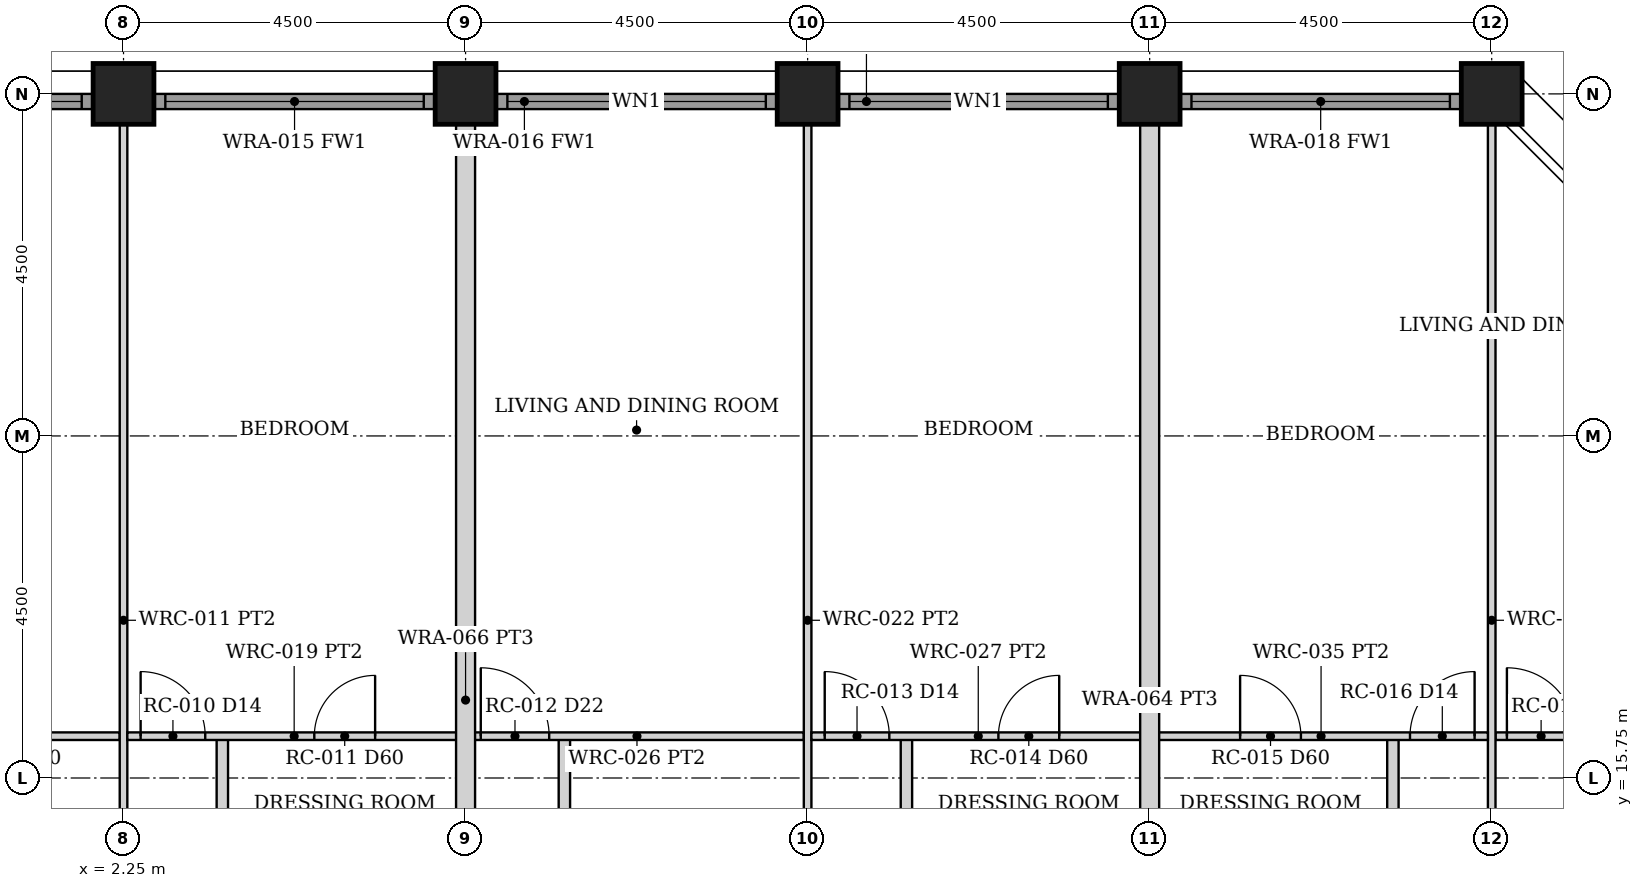
"""IFC4 building model, lengths in metres.
Left out: names, types, materials, properties, quantities, classifications, styles, units other than length and angle.
Written with IfcOpenShell. Run it as: python <this file> out.ifc"""

import sys

from ifc_helpers import new_model, si_unit, direction, frame, frame_2d, origin, origin_2d, place, context, subcontext, project, spatial, rectangle, hollow_rectangle, extrude, element, fill, save


model = new_model("IFC4")
c1 = context("Model", 3, precision=1e-05, world=origin(), true_north=direction((0.0, 1.0)))
c2 = subcontext(c1, "Body", "Model", "MODEL_VIEW")
j1 = project(units=[si_unit("LENGTHUNIT", "METRE"), si_unit("PLANEANGLEUNIT", "RADIAN")], contexts=[c1])
p1 = place(None, origin())
s1 = spatial("IfcSite", under=j1, at=p1, CompositionType="ELEMENT")
p2 = place(p1, origin())
s2 = spatial("IfcBuilding", under=s1, at=p2, CompositionType="ELEMENT")
p3 = place(p2, frame((0.0, 0.0, 47.5)))
s3 = spatial("IfcBuildingStorey", under=s2, at=p3, CompositionType="ELEMENT", Elevation=47.5)
for number, where, z_axis, x_axis in (
    (1, (2.25, 24.75, 0.0), (0.0, 0.0, 1.0), (0.0, 1.0, 0.0)),
    (2, (6.75, 24.75, 0.0), (0.0, 0.0, 1.0), (0.0, 1.0, 0.0)),
    (3, (11.25, 24.75, 0.0), (0.0, 0.0, 1.0), (0.0, 1.0, 0.0)),
    (4, (15.75, 24.75, 0.0), (0.0, 0.0, 1.0), (0.0, 1.0, 0.0)),
    (5, (20.25, 24.75, 0.0), (0.0, 0.0, 1.0), (0.0, 1.0, 0.0)),
):
    element("IfcColumn", number, at=place(p3, frame(where, z_axis=z_axis, x_axis=x_axis)), inside=s3, PredefinedType="COLUMN", context=c2, shape_type="SweptSolid", body=[
        extrude(hollow_rectangle(XDim=0.8, YDim=0.8, WallThickness=0.07, at=origin_2d()), origin(), (0.0, 0.0, 1.0), 3.5),
    ])
p4 = place(p3, frame((-1.845, 24.65, 0.0), z_axis=(0.0, 0.0, 1.0), x_axis=(1.0, 0.0, 0.0)))
e6 = element("IfcWall", 6, at=p4, inside=s3, PredefinedType="SOLIDWALL", context=c2, shape_type="SweptSolid", body=[
    extrude(rectangle(XDim=3.69, YDim=0.2, at=frame_2d((1.845, 0.0))), origin(), (0.0, 0.0, 1.0), 2.379),
])
p5 = place(p4, frame((0.145, 0.0, 0.3)))
e7 = element("IfcOpeningElement", 7, at=p5, cuts=e6, PredefinedType="OPENING", context=c2, shape_type="SweptSolid", body=[
    extrude(rectangle(XDim=3.4, YDim=1.929, at=frame_2d((1.7, 0.964))), frame((0.0, 0.11, 0.0), z_axis=(0.0, -1.0, 0.0), x_axis=(1.0, 0.0, 0.0)), (0.0, 0.0, 1.0), 0.22),
])
p6 = place(p3, frame((2.655, 24.65, 0.0), z_axis=(0.0, 0.0, 1.0), x_axis=(1.0, 0.0, 0.0)))
e8 = element("IfcWall", 8, at=p6, inside=s3, PredefinedType="SOLIDWALL", context=c2, shape_type="SweptSolid", body=[
    extrude(rectangle(XDim=3.69, YDim=0.2, at=frame_2d((1.845, 0.0))), origin(), (0.0, 0.0, 1.0), 2.379),
])
p7 = place(p6, frame((0.145, 0.0, 0.3)))
e9 = element("IfcOpeningElement", 9, at=p7, cuts=e8, PredefinedType="OPENING", context=c2, shape_type="SweptSolid", body=[
    extrude(rectangle(XDim=3.4, YDim=1.929, at=frame_2d((1.7, 0.964))), frame((0.0, 0.11, 0.0), z_axis=(0.0, -1.0, 0.0), x_axis=(1.0, 0.0, 0.0)), (0.0, 0.0, 1.0), 0.22),
])
p8 = place(p3, frame((7.155, 24.65, 0.0), z_axis=(0.0, 0.0, 1.0), x_axis=(1.0, 0.0, 0.0)))
e10 = element("IfcWall", 10, at=p8, inside=s3, PredefinedType="SOLIDWALL", context=c2, shape_type="SweptSolid", body=[
    extrude(rectangle(XDim=3.69, YDim=0.2, at=frame_2d((1.845, 0.0))), origin(), (0.0, 0.0, 1.0), 2.379),
])
p9 = place(p8, frame((0.145, 0.0, 0.3)))
e11 = element("IfcOpeningElement", 11, at=p9, cuts=e10, PredefinedType="OPENING", context=c2, shape_type="SweptSolid", body=[
    extrude(rectangle(XDim=3.4, YDim=1.929, at=frame_2d((1.7, 0.964))), frame((0.0, 0.11, 0.0), z_axis=(0.0, -1.0, 0.0), x_axis=(1.0, 0.0, 0.0)), (0.0, 0.0, 1.0), 0.22),
])
p10 = place(p3, frame((11.655, 24.65, 0.0), z_axis=(0.0, 0.0, 1.0), x_axis=(1.0, 0.0, 0.0)))
e12 = element("IfcWall", 12, at=p10, inside=s3, PredefinedType="SOLIDWALL", context=c2, shape_type="SweptSolid", body=[
    extrude(rectangle(XDim=3.69, YDim=0.2, at=frame_2d((1.845, 0.0))), origin(), (0.0, 0.0, 1.0), 2.379),
])
p11 = place(p10, frame((0.145, 0.0, 0.3)))
e13 = element("IfcOpeningElement", 13, at=p11, cuts=e12, PredefinedType="OPENING", context=c2, shape_type="SweptSolid", body=[
    extrude(rectangle(XDim=3.4, YDim=1.929, at=frame_2d((1.7, 0.964))), frame((0.0, 0.11, 0.0), z_axis=(0.0, -1.0, 0.0), x_axis=(1.0, 0.0, 0.0)), (0.0, 0.0, 1.0), 0.22),
])
p12 = place(p3, frame((16.155, 24.65, 0.0), z_axis=(0.0, 0.0, 1.0), x_axis=(1.0, 0.0, 0.0)))
e14 = element("IfcWall", 14, at=p12, inside=s3, PredefinedType="SOLIDWALL", context=c2, shape_type="SweptSolid", body=[
    extrude(rectangle(XDim=3.69, YDim=0.2, at=frame_2d((1.845, 0.0))), origin(), (0.0, 0.0, 1.0), 2.379),
])
p13 = place(p12, frame((0.145, 0.0, 0.3)))
e15 = element("IfcOpeningElement", 15, at=p13, cuts=e14, PredefinedType="OPENING", context=c2, shape_type="SweptSolid", body=[
    extrude(rectangle(XDim=3.4, YDim=1.929, at=frame_2d((1.7, 0.964))), frame((0.0, 0.11, 0.0), z_axis=(0.0, -1.0, 0.0), x_axis=(1.0, 0.0, 0.0)), (0.0, 0.0, 1.0), 0.22),
])
p14 = place(p3, frame((-2.2, 16.3, 0.0), z_axis=(0.0, 0.0, 1.0), x_axis=(1.0, 0.0, 0.0)))
e16 = element("IfcWall", 16, at=p14, inside=s3, PredefinedType="PARTITIONING", context=c2, shape_type="SweptSolid", body=[
    extrude(rectangle(XDim=4.4, YDim=0.1, at=frame_2d((2.2, 0.0))), origin(), (0.0, 0.0, 1.0), 2.373),
])
p15 = place(p14, frame((0.175, 0.0, 0.0)))
e17 = element("IfcOpeningElement", 17, at=p15, cuts=e16, PredefinedType="OPENING", context=c2, shape_type="SweptSolid", body=[
    extrude(rectangle(XDim=0.85, YDim=2.1, at=frame_2d((0.425, 1.05))), frame((0.0, 0.06, 0.0), z_axis=(0.0, -1.0, 0.0), x_axis=(1.0, 0.0, 0.0)), (0.0, 0.0, 1.0), 0.12),
])
p16 = place(p14, frame((2.46, 0.0, 0.0)))
e18 = element("IfcOpeningElement", 18, at=p16, cuts=e16, PredefinedType="OPENING", context=c2, shape_type="SweptSolid", body=[
    extrude(rectangle(XDim=0.8, YDim=2.1, at=frame_2d((0.4, 1.05))), frame((0.0, 0.06, 0.0), z_axis=(0.0, -1.0, 0.0), x_axis=(1.0, 0.0, 0.0)), (0.0, 0.0, 1.0), 0.12),
])
p17 = place(p3, frame((2.25, 11.3, 0.0), z_axis=(0.0, 0.0, 1.0), x_axis=(0.0, 1.0, 0.0)))
e19 = element("IfcWall", 19, at=p17, inside=s3, PredefinedType="PARTITIONING", context=c2, shape_type="SweptSolid", body=[
    extrude(rectangle(XDim=13.05, YDim=0.1, at=frame_2d((6.525, 0.0))), origin(), (0.0, 0.0, 1.0), 2.373),
])
p18 = place(p3, frame((3.55, 11.3, 0.0), z_axis=(0.0, 0.0, 1.0), x_axis=(0.0, 1.0, 0.0)))
e20 = element("IfcWall", 20, at=p18, inside=s3, PredefinedType="PARTITIONING", context=c2, shape_type="SweptSolid", body=[
    extrude(rectangle(XDim=5.0, YDim=0.15, at=frame_2d((2.5, 0.0))), origin(), (0.0, 0.0, 1.0), 2.373),
])
p19 = place(p18, frame((0.85, 0.0, 0.0)))
e21 = element("IfcOpeningElement", 21, at=p19, cuts=e20, PredefinedType="OPENING", context=c2, shape_type="SweptSolid", body=[
    extrude(rectangle(XDim=0.9, YDim=2.1, at=frame_2d((0.45, 1.05))), frame((0.0, 0.085, 0.0), z_axis=(0.0, -1.0, 0.0), x_axis=(1.0, 0.0, 0.0)), (0.0, 0.0, 1.0), 0.17),
])
p20 = place(p3, frame((2.3, 16.3, 0.0), z_axis=(0.0, 0.0, 1.0), x_axis=(1.0, 0.0, 0.0)))
e22 = element("IfcWall", 22, at=p20, inside=s3, PredefinedType="PARTITIONING", context=c2, shape_type="SweptSolid", body=[
    extrude(rectangle(XDim=4.39, YDim=0.1, at=frame_2d((2.195, 0.0))), origin(), (0.0, 0.0, 1.0), 2.373),
])
p21 = place(p20, frame((0.175, 0.0, 0.0)))
e23 = element("IfcOpeningElement", 23, at=p21, cuts=e22, PredefinedType="OPENING", context=c2, shape_type="SweptSolid", body=[
    extrude(rectangle(XDim=0.85, YDim=2.1, at=frame_2d((0.425, 1.05))), frame((0.0, 0.06, 0.0), z_axis=(0.0, -1.0, 0.0), x_axis=(1.0, 0.0, 0.0)), (0.0, 0.0, 1.0), 0.12),
])
p22 = place(p20, frame((2.46, 0.0, 0.0)))
e24 = element("IfcOpeningElement", 24, at=p22, cuts=e22, PredefinedType="OPENING", context=c2, shape_type="SweptSolid", body=[
    extrude(rectangle(XDim=0.8, YDim=2.1, at=frame_2d((0.4, 1.05))), frame((0.0, 0.06, 0.0), z_axis=(0.0, -1.0, 0.0), x_axis=(1.0, 0.0, 0.0)), (0.0, 0.0, 1.0), 0.12),
])
p23 = place(p3, frame((8.05, 11.3, 0.0), z_axis=(0.0, 0.0, 1.0), x_axis=(0.0, 1.0, 0.0)))
e25 = element("IfcWall", 25, at=p23, inside=s3, PredefinedType="PARTITIONING", context=c2, shape_type="SweptSolid", body=[
    extrude(rectangle(XDim=5.0, YDim=0.15, at=frame_2d((2.5, 0.0))), origin(), (0.0, 0.0, 1.0), 2.373),
])
p24 = place(p23, frame((2.05, 0.0, 0.0)))
e26 = element("IfcOpeningElement", 26, at=p24, cuts=e25, PredefinedType="OPENING", context=c2, shape_type="SweptSolid", body=[
    extrude(rectangle(XDim=0.9, YDim=2.1, at=frame_2d((0.45, 1.05))), frame((0.0, 0.085, 0.0), z_axis=(0.0, -1.0, 0.0), x_axis=(1.0, 0.0, 0.0)), (0.0, 0.0, 1.0), 0.17),
])
p25 = place(p3, frame((6.81, 16.3, 0.0), z_axis=(0.0, 0.0, 1.0), x_axis=(1.0, 0.0, 0.0)))
e27 = element("IfcWall", 27, at=p25, inside=s3, PredefinedType="PARTITIONING", context=c2, shape_type="SweptSolid", body=[
    extrude(rectangle(XDim=4.39, YDim=0.1, at=frame_2d((2.195, 0.0))), origin(), (0.0, 0.0, 1.0), 2.373),
])
p26 = place(p25, frame((0.14, 0.0, 0.0)))
e28 = element("IfcOpeningElement", 28, at=p26, cuts=e27, PredefinedType="OPENING", context=c2, shape_type="SweptSolid", body=[
    extrude(rectangle(XDim=0.9, YDim=2.1, at=frame_2d((0.45, 1.05))), frame((0.0, 0.06, 0.0), z_axis=(0.0, -1.0, 0.0), x_axis=(1.0, 0.0, 0.0)), (0.0, 0.0, 1.0), 0.12),
])
p27 = place(p3, frame((11.25, 11.3, 0.0), z_axis=(0.0, 0.0, 1.0), x_axis=(0.0, 1.0, 0.0)))
e29 = element("IfcWall", 29, at=p27, inside=s3, PredefinedType="PARTITIONING", context=c2, shape_type="SweptSolid", body=[
    extrude(rectangle(XDim=13.05, YDim=0.1, at=frame_2d((6.525, 0.0))), origin(), (0.0, 0.0, 1.0), 2.373),
])
p28 = place(p3, frame((12.55, 11.3, 0.0), z_axis=(0.0, 0.0, 1.0), x_axis=(0.0, 1.0, 0.0)))
e30 = element("IfcWall", 30, at=p28, inside=s3, PredefinedType="PARTITIONING", context=c2, shape_type="SweptSolid", body=[
    extrude(rectangle(XDim=5.0, YDim=0.15, at=frame_2d((2.5, 0.0))), origin(), (0.0, 0.0, 1.0), 2.373),
])
p29 = place(p28, frame((0.85, 0.0, 0.0)))
e31 = element("IfcOpeningElement", 31, at=p29, cuts=e30, PredefinedType="OPENING", context=c2, shape_type="SweptSolid", body=[
    extrude(rectangle(XDim=0.9, YDim=2.1, at=frame_2d((0.45, 1.05))), frame((0.0, 0.085, 0.0), z_axis=(0.0, -1.0, 0.0), x_axis=(1.0, 0.0, 0.0)), (0.0, 0.0, 1.0), 0.17),
])
p30 = place(p3, frame((11.3, 16.3, 0.0), z_axis=(0.0, 0.0, 1.0), x_axis=(1.0, 0.0, 0.0)))
e32 = element("IfcWall", 32, at=p30, inside=s3, PredefinedType="PARTITIONING", context=c2, shape_type="SweptSolid", body=[
    extrude(rectangle(XDim=4.39, YDim=0.1, at=frame_2d((2.195, 0.0))), origin(), (0.0, 0.0, 1.0), 2.373),
])
p31 = place(p30, frame((0.175, 0.0, 0.0)))
e33 = element("IfcOpeningElement", 33, at=p31, cuts=e32, PredefinedType="OPENING", context=c2, shape_type="SweptSolid", body=[
    extrude(rectangle(XDim=0.85, YDim=2.1, at=frame_2d((0.425, 1.05))), frame((0.0, 0.06, 0.0), z_axis=(0.0, -1.0, 0.0), x_axis=(1.0, 0.0, 0.0)), (0.0, 0.0, 1.0), 0.12),
])
p32 = place(p30, frame((2.46, 0.0, 0.0)))
e34 = element("IfcOpeningElement", 34, at=p32, cuts=e32, PredefinedType="OPENING", context=c2, shape_type="SweptSolid", body=[
    extrude(rectangle(XDim=0.8, YDim=2.1, at=frame_2d((0.4, 1.05))), frame((0.0, 0.06, 0.0), z_axis=(0.0, -1.0, 0.0), x_axis=(1.0, 0.0, 0.0)), (0.0, 0.0, 1.0), 0.12),
])
p33 = place(p3, frame((20.3, 16.3, 0.0), z_axis=(0.0, 0.0, 1.0), x_axis=(1.0, 0.0, 0.0)))
e35 = element("IfcWall", 35, at=p33, inside=s3, PredefinedType="PARTITIONING", context=c2, shape_type="SweptSolid", body=[
    extrude(rectangle(XDim=4.25, YDim=0.1, at=frame_2d((2.125, 0.0))), origin(), (0.0, 0.0, 1.0), 2.373),
])
p34 = place(p33, frame((0.15, 0.0, 0.0)))
e36 = element("IfcOpeningElement", 36, at=p34, cuts=e35, PredefinedType="OPENING", context=c2, shape_type="SweptSolid", body=[
    extrude(rectangle(XDim=0.9, YDim=2.1, at=frame_2d((0.45, 1.05))), frame((0.0, 0.06, 0.0), z_axis=(0.0, -1.0, 0.0), x_axis=(1.0, 0.0, 0.0)), (0.0, 0.0, 1.0), 0.12),
])
p35 = place(p3, frame((20.25, 11.3, 0.0), z_axis=(0.0, 0.0, 1.0), x_axis=(0.0, 1.0, 0.0)))
e37 = element("IfcWall", 37, at=p35, inside=s3, PredefinedType="PARTITIONING", context=c2, shape_type="SweptSolid", body=[
    extrude(rectangle(XDim=13.05, YDim=0.1, at=frame_2d((6.525, 0.0))), origin(), (0.0, 0.0, 1.0), 2.373),
])
p36 = place(p3, frame((18.95, 11.3, 0.0), z_axis=(0.0, 0.0, 1.0), x_axis=(0.0, 1.0, 0.0)))
e38 = element("IfcWall", 38, at=p36, inside=s3, PredefinedType="PARTITIONING", context=c2, shape_type="SweptSolid", body=[
    extrude(rectangle(XDim=5.0, YDim=0.15, at=frame_2d((2.5, 0.0))), origin(), (0.0, 0.0, 1.0), 2.373),
])
p37 = place(p36, frame((0.85, 0.0, 0.0)))
e39 = element("IfcOpeningElement", 39, at=p37, cuts=e38, PredefinedType="OPENING", context=c2, shape_type="SweptSolid", body=[
    extrude(rectangle(XDim=0.9, YDim=2.1, at=frame_2d((0.45, 1.05))), frame((0.0, 0.085, 0.0), z_axis=(0.0, -1.0, 0.0), x_axis=(1.0, 0.0, 0.0)), (0.0, 0.0, 1.0), 0.17),
])
p38 = place(p3, frame((15.81, 16.3, 0.0), z_axis=(0.0, 0.0, 1.0), x_axis=(1.0, 0.0, 0.0)))
e40 = element("IfcWall", 40, at=p38, inside=s3, PredefinedType="PARTITIONING", context=c2, shape_type="SweptSolid", body=[
    extrude(rectangle(XDim=4.39, YDim=0.1, at=frame_2d((2.195, 0.0))), origin(), (0.0, 0.0, 1.0), 2.373),
])
p39 = place(p38, frame((3.365, 0.0, 0.0)))
e41 = element("IfcOpeningElement", 41, at=p39, cuts=e40, PredefinedType="OPENING", context=c2, shape_type="SweptSolid", body=[
    extrude(rectangle(XDim=0.85, YDim=2.1, at=frame_2d((0.425, 1.05))), frame((0.0, 0.06, 0.0), z_axis=(0.0, -1.0, 0.0), x_axis=(1.0, 0.0, 0.0)), (0.0, 0.0, 1.0), 0.12),
])
p40 = place(p38, frame((1.13, 0.0, 0.0)))
e42 = element("IfcOpeningElement", 42, at=p40, cuts=e40, PredefinedType="OPENING", context=c2, shape_type="SweptSolid", body=[
    extrude(rectangle(XDim=0.8, YDim=2.1, at=frame_2d((0.4, 1.05))), frame((0.0, 0.06, 0.0), z_axis=(0.0, -1.0, 0.0), x_axis=(1.0, 0.0, 0.0)), (0.0, 0.0, 1.0), 0.12),
])
for number, where, z_axis, x_axis in (
    (43, (6.75, 9.2, 0.0), (0.0, 0.0, 1.0), (0.0, 1.0, 0.0)),
    (44, (15.75, 9.2, 0.0), (0.0, 0.0, 1.0), (0.0, 1.0, 0.0)),
):
    element("IfcWall", number, at=place(p3, frame(where, z_axis=z_axis, x_axis=x_axis)), inside=s3, PredefinedType="PARTITIONING", context=c2, shape_type="SweptSolid", body=[
        extrude(rectangle(XDim=15.15, YDim=0.25, at=frame_2d((7.575, 0.0))), origin(), (0.0, 0.0, 1.0), 2.373),
    ])
p41 = place(p5, origin())
e45 = element("IfcWindow", 45, at=p41, inside=s3, PartitioningType="SINGLE_PANEL", PredefinedType="WINDOW", context=c2, shape_type="SweptSolid", body=[
    extrude(rectangle(XDim=3.4, YDim=1.929, at=frame_2d((1.7, 0.964))), frame((0.0, 0.03, 0.0), z_axis=(0.0, -1.0, 0.0), x_axis=(1.0, 0.0, 0.0)), (0.0, 0.0, 1.0), 0.06),
])
fill(e7, e45)
p42 = place(p7, origin())
e46 = element("IfcWindow", 46, at=p42, inside=s3, PartitioningType="SINGLE_PANEL", PredefinedType="WINDOW", context=c2, shape_type="SweptSolid", body=[
    extrude(rectangle(XDim=3.4, YDim=1.929, at=frame_2d((1.7, 0.964))), frame((0.0, 0.03, 0.0), z_axis=(0.0, -1.0, 0.0), x_axis=(1.0, 0.0, 0.0)), (0.0, 0.0, 1.0), 0.06),
])
fill(e9, e46)
p43 = place(p9, origin())
e47 = element("IfcWindow", 47, at=p43, inside=s3, PartitioningType="SINGLE_PANEL", PredefinedType="WINDOW", context=c2, shape_type="SweptSolid", body=[
    extrude(rectangle(XDim=3.4, YDim=1.929, at=frame_2d((1.7, 0.964))), frame((0.0, 0.03, 0.0), z_axis=(0.0, -1.0, 0.0), x_axis=(1.0, 0.0, 0.0)), (0.0, 0.0, 1.0), 0.06),
])
fill(e11, e47)
p44 = place(p11, origin())
e48 = element("IfcWindow", 48, at=p44, inside=s3, PartitioningType="SINGLE_PANEL", PredefinedType="WINDOW", context=c2, shape_type="SweptSolid", body=[
    extrude(rectangle(XDim=3.4, YDim=1.929, at=frame_2d((1.7, 0.964))), frame((0.0, 0.03, 0.0), z_axis=(0.0, -1.0, 0.0), x_axis=(1.0, 0.0, 0.0)), (0.0, 0.0, 1.0), 0.06),
])
fill(e13, e48)
p45 = place(p13, origin())
e49 = element("IfcWindow", 49, at=p45, inside=s3, PartitioningType="SINGLE_PANEL", PredefinedType="WINDOW", context=c2, shape_type="SweptSolid", body=[
    extrude(rectangle(XDim=3.4, YDim=1.929, at=frame_2d((1.7, 0.964))), frame((0.0, 0.03, 0.0), z_axis=(0.0, -1.0, 0.0), x_axis=(1.0, 0.0, 0.0)), (0.0, 0.0, 1.0), 0.06),
])
fill(e15, e49)
p46 = place(p21, origin())
e50 = element("IfcDoor", 50, at=p46, inside=s3, OperationType="SINGLE_SWING_LEFT", PredefinedType="DOOR", context=c2, shape_type="SweptSolid", body=[
    extrude(rectangle(XDim=0.85, YDim=2.1, at=frame_2d((0.425, 1.05))), frame((0.0, 0.025, 0.0), z_axis=(0.0, -1.0, 0.0), x_axis=(1.0, 0.0, 0.0)), (0.0, 0.0, 1.0), 0.05),
])
fill(e23, e50)
p47 = place(p22, origin())
e51 = element("IfcDoor", 51, at=p47, inside=s3, OperationType="SINGLE_SWING_RIGHT", PredefinedType="DOOR", context=c2, shape_type="SweptSolid", body=[
    extrude(rectangle(XDim=0.8, YDim=2.1, at=frame_2d((0.4, 1.05))), frame((0.0, 0.025, 0.0), z_axis=(0.0, -1.0, 0.0), x_axis=(1.0, 0.0, 0.0)), (0.0, 0.0, 1.0), 0.05),
])
fill(e24, e51)
p48 = place(p26, origin())
e52 = element("IfcDoor", 52, at=p48, inside=s3, OperationType="SINGLE_SWING_LEFT", PredefinedType="DOOR", context=c2, shape_type="SweptSolid", body=[
    extrude(rectangle(XDim=0.9, YDim=2.1, at=frame_2d((0.45, 1.05))), frame((0.0, 0.025, 0.0), z_axis=(0.0, -1.0, 0.0), x_axis=(1.0, 0.0, 0.0)), (0.0, 0.0, 1.0), 0.05),
])
fill(e28, e52)
p49 = place(p31, origin())
e53 = element("IfcDoor", 53, at=p49, inside=s3, OperationType="SINGLE_SWING_LEFT", PredefinedType="DOOR", context=c2, shape_type="SweptSolid", body=[
    extrude(rectangle(XDim=0.85, YDim=2.1, at=frame_2d((0.425, 1.05))), frame((0.0, 0.025, 0.0), z_axis=(0.0, -1.0, 0.0), x_axis=(1.0, 0.0, 0.0)), (0.0, 0.0, 1.0), 0.05),
])
fill(e33, e53)
p50 = place(p32, origin())
e54 = element("IfcDoor", 54, at=p50, inside=s3, OperationType="SINGLE_SWING_RIGHT", PredefinedType="DOOR", context=c2, shape_type="SweptSolid", body=[
    extrude(rectangle(XDim=0.8, YDim=2.1, at=frame_2d((0.4, 1.05))), frame((0.0, 0.025, 0.0), z_axis=(0.0, -1.0, 0.0), x_axis=(1.0, 0.0, 0.0)), (0.0, 0.0, 1.0), 0.05),
])
fill(e34, e54)
p51 = place(p34, origin())
e55 = element("IfcDoor", 55, at=p51, inside=s3, OperationType="SINGLE_SWING_LEFT", PredefinedType="DOOR", context=c2, shape_type="SweptSolid", body=[
    extrude(rectangle(XDim=0.9, YDim=2.1, at=frame_2d((0.45, 1.05))), frame((0.0, 0.025, 0.0), z_axis=(0.0, -1.0, 0.0), x_axis=(1.0, 0.0, 0.0)), (0.0, 0.0, 1.0), 0.05),
])
fill(e36, e55)
p52 = place(p39, origin())
e56 = element("IfcDoor", 56, at=p52, inside=s3, OperationType="SINGLE_SWING_RIGHT", PredefinedType="DOOR", context=c2, shape_type="SweptSolid", body=[
    extrude(rectangle(XDim=0.85, YDim=2.1, at=frame_2d((0.425, 1.05))), frame((0.0, 0.025, 0.0), z_axis=(0.0, -1.0, 0.0), x_axis=(1.0, 0.0, 0.0)), (0.0, 0.0, 1.0), 0.05),
])
fill(e41, e56)
p53 = place(p40, origin())
e57 = element("IfcDoor", 57, at=p53, inside=s3, OperationType="SINGLE_SWING_LEFT", PredefinedType="DOOR", context=c2, shape_type="SweptSolid", body=[
    extrude(rectangle(XDim=0.8, YDim=2.1, at=frame_2d((0.4, 1.05))), frame((0.0, 0.025, 0.0), z_axis=(0.0, -1.0, 0.0), x_axis=(1.0, 0.0, 0.0)), (0.0, 0.0, 1.0), 0.05),
])
fill(e42, e57)
save(model, sys.argv[1])
